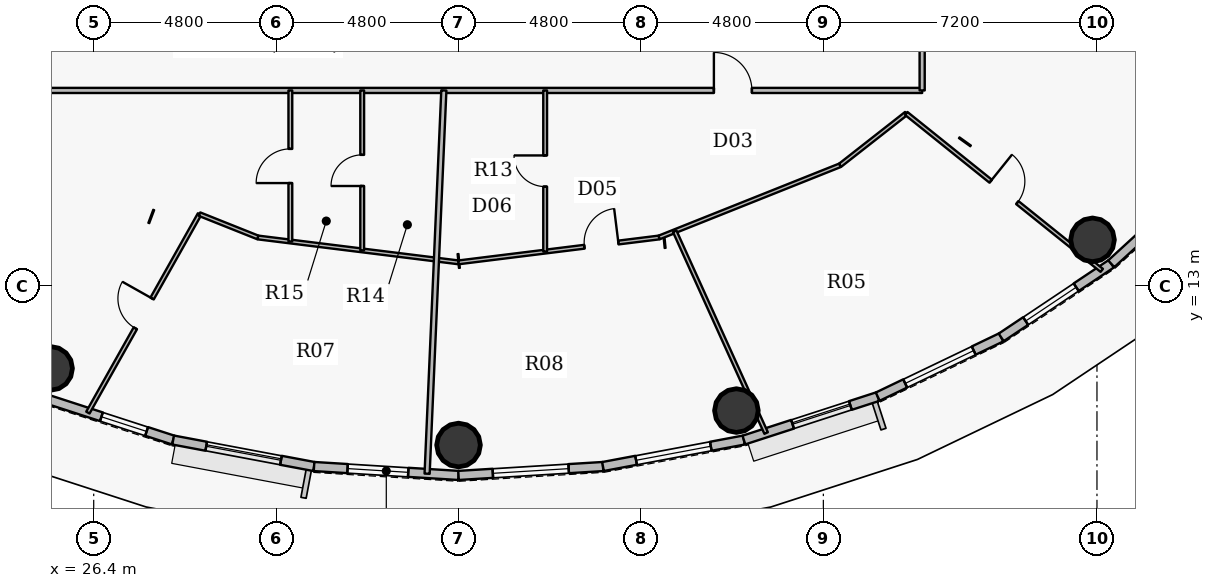
"""IFC4 building model, lengths in metres.
Left out: names, types, materials, properties, quantities, classifications, styles, units other than length and angle.
Written with IfcOpenShell. Run it as: python <this file> out.ifc"""

import sys

from ifc_helpers import new_model, si_unit, direction, frame, frame_2d, origin, origin_2d, place, context, subcontext, project, spatial, rectangle, hollow_circle, extrude, source, transform, mapped, element, fill, save


model = new_model("IFC4")
c1 = context("Model", 3, precision=1e-05, world=origin(), true_north=direction((0.0, 1.0)))
c2 = subcontext(c1, "Body", "Model", "MODEL_VIEW")
j1 = project(units=[si_unit("LENGTHUNIT", "METRE"), si_unit("PLANEANGLEUNIT", "RADIAN")], contexts=[c1])
p1 = place(None, origin())
s1 = spatial("IfcSite", under=j1, at=p1, CompositionType="ELEMENT")
p2 = place(p1, origin())
s2 = spatial("IfcBuilding", under=s1, at=p2, CompositionType="ELEMENT")
p3 = place(p2, frame((0.0, 0.0, 210.3)))
s3 = spatial("IfcBuildingStorey", under=s2, at=p3, CompositionType="ELEMENT", Elevation=210.3)
for number, where, z_axis, x_axis in (
    (1, (25.265, 10.836, -0.25), (0.0, 0.0, 1.0), (1.0, 0.0, 0.0)),
    (2, (36.0, 8.82, -0.25), (0.0, 0.0, 1.0), (1.0, 0.0, 0.0)),
    (3, (43.312, 9.727, -0.25), (0.0, 0.0, 1.0), (1.0, 0.0, 0.0)),
    (4, (52.683, 14.219, -0.25), (0.0, 0.0, 1.0), (1.0, 0.0, 0.0)),
):
    element("IfcColumn", number, at=place(p3, frame(where, z_axis=z_axis, x_axis=x_axis)), inside=s3, PredefinedType="COLUMN", context=c2, shape_type="SweptSolid", body=[
        extrude(hollow_circle(Radius=0.575, WallThickness=0.036, at=origin_2d()), origin(), (0.0, 0.0, 1.0), 4.0),
    ])
p4 = place(p3, frame((28.491, 8.951, 0.0), z_axis=(0.0, 0.0, 1.0), x_axis=(-0.951210789182, 0.308541787354, 0.0)))
e5 = element("IfcWall", 5, at=p4, inside=s3, PredefinedType="SOLIDWALL", context=c2, shape_type="SweptSolid", body=[
    extrude(rectangle(XDim=3.702, YDim=0.24, at=frame_2d((1.851, 0.0))), origin(), (0.0, 0.0, 1.0), 3.5),
])
p5 = place(p4, frame((0.735, 0.0, 0.9)))
e6 = element("IfcOpeningElement", 6, at=p5, cuts=e5, PredefinedType="OPENING", context=c2, shape_type="SweptSolid", body=[
    extrude(rectangle(XDim=1.25, YDim=1.65, at=origin_2d()), frame((0.625, 0.13, 0.825), z_axis=(0.0, -1.0, 0.0), x_axis=(1.0, 0.0, 0.0)), (0.0, 0.0, 1.0), 0.26),
])
p6 = place(p3, frame((32.198, 8.254, 0.0), z_axis=(0.0, 0.0, 1.0), x_axis=(-0.982784898575, 0.184753465822, 0.0)))
e7 = element("IfcWall", 7, at=p6, inside=s3, PredefinedType="SOLIDWALL", context=c2, shape_type="SweptSolid", body=[
    extrude(rectangle(XDim=3.773, YDim=0.24, at=frame_2d((1.886, 0.0))), origin(), (0.0, 0.0, 1.0), 3.5),
])
p7 = place(p6, frame((0.886, 0.0, 0.9)))
e8 = element("IfcOpeningElement", 8, at=p7, cuts=e7, PredefinedType="OPENING", context=c2, shape_type="SweptSolid", body=[
    extrude(rectangle(XDim=2.0, YDim=1.75, at=origin_2d()), frame((1.0, 0.13, 0.875), z_axis=(0.0, -1.0, 0.0), x_axis=(1.0, 0.0, 0.0)), (0.0, 0.0, 1.0), 0.26),
])
p8 = place(p3, frame((36.0, 8.02, 0.0), z_axis=(0.0, 0.0, 1.0), x_axis=(-0.998108785312, 0.06147237333, 0.0)))
e9 = element("IfcWall", 9, at=p8, inside=s3, PredefinedType="SOLIDWALL", context=c2, shape_type="SweptSolid", body=[
    extrude(rectangle(XDim=3.809, YDim=0.24, at=frame_2d((1.904, 0.0))), origin(), (0.0, 0.0, 1.0), 3.5),
])
p9 = place(p8, frame((1.326, 0.0, 0.9)))
e10 = element("IfcOpeningElement", 10, at=p9, cuts=e9, PredefinedType="OPENING", context=c2, shape_type="SweptSolid", body=[
    extrude(rectangle(XDim=1.6, YDim=1.75, at=origin_2d()), frame((0.8, 0.13, 0.875), z_axis=(0.0, -1.0, 0.0), x_axis=(1.0, 0.0, 0.0)), (0.0, 0.0, 1.0), 0.26),
])
p10 = place(p3, frame((39.802, 8.254, 0.0), z_axis=(0.0, 0.0, 1.0), x_axis=(-0.998108785312, -0.06147237333, 0.0)))
e11 = element("IfcWall", 11, at=p10, inside=s3, PredefinedType="SOLIDWALL", context=c2, shape_type="SweptSolid", body=[
    extrude(rectangle(XDim=3.809, YDim=0.24, at=frame_2d((1.904, 0.0))), origin(), (0.0, 0.0, 1.0), 3.5),
])
p11 = place(p10, frame((0.905, 0.0, 0.9)))
e12 = element("IfcOpeningElement", 12, at=p11, cuts=e11, PredefinedType="OPENING", context=c2, shape_type="SweptSolid", body=[
    extrude(rectangle(XDim=2.0, YDim=1.75, at=origin_2d()), frame((1.0, 0.13, 0.875), z_axis=(0.0, -1.0, 0.0), x_axis=(1.0, 0.0, 0.0)), (0.0, 0.0, 1.0), 0.26),
])
p12 = place(p3, frame((43.509, 8.951, 0.0), z_axis=(0.0, 0.0, 1.0), x_axis=(-0.982784898575, -0.184753465822, 0.0)))
e13 = element("IfcWall", 13, at=p12, inside=s3, PredefinedType="SOLIDWALL", context=c2, shape_type="SweptSolid", body=[
    extrude(rectangle(XDim=3.773, YDim=0.24, at=frame_2d((1.886, 0.0))), origin(), (0.0, 0.0, 1.0), 3.5),
])
p13 = place(p12, frame((0.886, 0.0, 0.9)))
e14 = element("IfcOpeningElement", 14, at=p13, cuts=e13, PredefinedType="OPENING", context=c2, shape_type="SweptSolid", body=[
    extrude(rectangle(XDim=2.0, YDim=1.75, at=origin_2d()), frame((1.0, 0.13, 0.875), z_axis=(0.0, -1.0, 0.0), x_axis=(1.0, 0.0, 0.0)), (0.0, 0.0, 1.0), 0.26),
])
p14 = place(p3, frame((47.031, 10.094, 0.0), z_axis=(0.0, 0.0, 1.0), x_axis=(-0.951210789182, -0.308541787354, 0.0)))
e15 = element("IfcWall", 15, at=p14, inside=s3, PredefinedType="SOLIDWALL", context=c2, shape_type="SweptSolid", body=[
    extrude(rectangle(XDim=3.702, YDim=0.24, at=frame_2d((1.851, 0.0))), origin(), (0.0, 0.0, 1.0), 3.5),
])
p15 = place(p14, frame((0.756, 0.0, 0.9)))
e16 = element("IfcOpeningElement", 16, at=p15, cuts=e15, PredefinedType="OPENING", context=c2, shape_type="SweptSolid", body=[
    extrude(rectangle(XDim=1.6, YDim=1.75, at=origin_2d()), frame((0.8, 0.13, 0.875), z_axis=(0.0, -1.0, 0.0), x_axis=(1.0, 0.0, 0.0)), (0.0, 0.0, 1.0), 0.26),
])
p16 = place(p3, frame((50.28, 11.652, 0.0), z_axis=(0.0, 0.0, 1.0), x_axis=(-0.901598104751, -0.432574684313, 0.0)))
e17 = element("IfcWall", 17, at=p16, inside=s3, PredefinedType="SOLIDWALL", context=c2, shape_type="SweptSolid", body=[
    extrude(rectangle(XDim=3.604, YDim=0.24, at=frame_2d((1.802, 0.0))), origin(), (0.0, 0.0, 1.0), 3.5),
])
p17 = place(p16, frame((0.802, 0.0, 0.9)))
e18 = element("IfcOpeningElement", 18, at=p17, cuts=e17, PredefinedType="OPENING", context=c2, shape_type="SweptSolid", body=[
    extrude(rectangle(XDim=2.0, YDim=1.75, at=origin_2d()), frame((1.0, 0.13, 0.875), z_axis=(0.0, -1.0, 0.0), x_axis=(1.0, 0.0, 0.0)), (0.0, 0.0, 1.0), 0.26),
])
p18 = place(p3, frame((53.176, 13.589, 0.0), z_axis=(0.0, 0.0, 1.0), x_axis=(-0.831262496074, -0.555880079352, 0.0)))
e19 = element("IfcWall", 19, at=p18, inside=s3, PredefinedType="SOLIDWALL", context=c2, shape_type="SweptSolid", body=[
    extrude(rectangle(XDim=3.484, YDim=0.24, at=frame_2d((1.742, 0.0))), origin(), (0.0, 0.0, 1.0), 3.5),
])
p19 = place(p18, frame((1.11, 0.0, 0.9)))
e20 = element("IfcOpeningElement", 20, at=p19, cuts=e19, PredefinedType="OPENING", context=c2, shape_type="SweptSolid", body=[
    extrude(rectangle(XDim=1.6, YDim=1.75, at=origin_2d()), frame((0.8, 0.13, 0.875), z_axis=(0.0, -1.0, 0.0), x_axis=(1.0, 0.0, 0.0)), (0.0, 0.0, 1.0), 0.26),
])
p20 = place(p3, frame((55.648, 15.855, 0.0), z_axis=(0.0, 0.0, 1.0), x_axis=(-0.737123922599, -0.675757591694, 0.0)))
e21 = element("IfcWall", 21, at=p20, inside=s3, PredefinedType="SOLIDWALL", context=c2, shape_type="SweptSolid", body=[
    extrude(rectangle(XDim=3.354, YDim=0.24, at=frame_2d((1.677, 0.0))), origin(), (0.0, 0.0, 1.0), 3.5),
])
p21 = place(p20, frame((1.052, 0.0, 0.9)))
e22 = element("IfcOpeningElement", 22, at=p21, cuts=e21, PredefinedType="OPENING", context=c2, shape_type="SweptSolid", body=[
    extrude(rectangle(XDim=1.25, YDim=1.65, at=origin_2d()), frame((0.625, 0.13, 0.825), z_axis=(0.0, -1.0, 0.0), x_axis=(1.0, 0.0, 0.0)), (0.0, 0.0, 1.0), 0.26),
])
p22 = place(p3, frame((24.35, 18.15, 0.0), z_axis=(0.0, 0.0, 1.0), x_axis=(1.0, 0.0, 0.0)))
e23 = element("IfcWall", 23, at=p22, inside=s3, PredefinedType="PARTITIONING", context=c2, shape_type="SweptSolid", body=[
    extrude(rectangle(XDim=23.85, YDim=0.135, at=frame_2d((11.925, 0.0))), origin(), (0.0, 0.0, 1.0), 2.935),
])
p23 = place(p22, frame((18.37, 0.0, 0.0)))
e24 = element("IfcOpeningElement", 24, at=p23, cuts=e23, PredefinedType="OPENING", context=c2, shape_type="SweptSolid", body=[
    extrude(rectangle(XDim=1.0, YDim=2.15, at=origin_2d()), frame((0.5, 0.078, 1.075), z_axis=(0.0, -1.0, 0.0), x_axis=(1.0, 0.0, 0.0)), (0.0, 0.0, 1.0), 0.155),
])
p24 = place(p3, frame((26.247, 9.674, 0.0), z_axis=(0.0, 0.0, 1.0), x_axis=(0.490510820462, 0.871435100859, 0.0)))
e25 = element("IfcWall", 25, at=p24, inside=s3, PredefinedType="PARTITIONING", context=c2, shape_type="SweptSolid", body=[
    extrude(rectangle(XDim=5.991, YDim=0.1, at=frame_2d((2.995, 0.0))), origin(), (0.0, 0.0, 1.0), 2.985),
])
p25 = place(p24, frame((2.545, 0.0, 0.0)))
e26 = element("IfcOpeningElement", 26, at=p25, cuts=e25, PredefinedType="OPENING", context=c2, shape_type="SweptSolid", body=[
    extrude(rectangle(XDim=0.9, YDim=2.1, at=origin_2d()), frame((0.45, 0.06, 1.05), z_axis=(0.0, -1.0, 0.0), x_axis=(1.0, 0.0, 0.0)), (0.0, 0.0, 1.0), 0.12),
])
p26 = place(p3, frame((29.186, 14.894, 0.0), z_axis=(0.0, 0.0, 1.0), x_axis=(0.928791895743, -0.37060169239, 0.0)))
e27 = element("IfcWall", 27, at=p26, inside=s3, PredefinedType="PARTITIONING", context=c2, shape_type="SweptSolid", body=[
    extrude(rectangle(XDim=1.654, YDim=0.1, at=frame_2d((0.827, 0.0))), origin(), (0.0, 0.0, 1.0), 3.5),
])
p27 = place(p3, frame((30.722, 14.281, 0.0), z_axis=(0.0, 0.0, 1.0), x_axis=(0.992398169186, -0.123068573551, 0.0)))
e28 = element("IfcWall", 28, at=p27, inside=s3, PredefinedType="PARTITIONING", context=c2, shape_type="SweptSolid", body=[
    extrude(rectangle(XDim=5.319, YDim=0.1, at=frame_2d((2.659, 0.0))), origin(), (0.0, 0.0, 1.0), 2.935),
])
p28 = place(p3, frame((31.574, 14.175, 0.0), z_axis=(0.0, 0.0, 1.0), x_axis=(0.0, 1.0, 0.0)))
e29 = element("IfcWall", 29, at=p28, inside=s3, PredefinedType="PARTITIONING", context=c2, shape_type="SweptSolid", body=[
    extrude(rectangle(XDim=3.975, YDim=0.1, at=frame_2d((1.987, 0.0))), origin(), (0.0, 0.0, 1.0), 3.5),
])
p29 = place(p28, frame((1.537, 0.0, 0.0)))
e30 = element("IfcOpeningElement", 30, at=p29, cuts=e29, PredefinedType="OPENING", context=c2, shape_type="SweptSolid", body=[
    extrude(rectangle(XDim=0.9, YDim=2.1, at=origin_2d()), frame((0.45, 0.06, 1.05), z_axis=(0.0, -1.0, 0.0), x_axis=(1.0, 0.0, 0.0)), (0.0, 0.0, 1.0), 0.12),
])
p30 = place(p3, frame((33.465, 13.941, 0.0), z_axis=(0.0, 0.0, 1.0), x_axis=(0.0, 1.0, 0.0)))
e31 = element("IfcWall", 31, at=p30, inside=s3, PredefinedType="PARTITIONING", context=c2, shape_type="SweptSolid", body=[
    extrude(rectangle(XDim=4.209, YDim=0.1, at=frame_2d((2.104, 0.0))), origin(), (0.0, 0.0, 1.0), 3.5),
])
p31 = place(p30, frame((1.695, 0.0, 0.0)))
e32 = element("IfcOpeningElement", 32, at=p31, cuts=e31, PredefinedType="OPENING", context=c2, shape_type="SweptSolid", body=[
    extrude(rectangle(XDim=0.82, YDim=2.1, at=origin_2d()), frame((0.41, 0.06, 1.05), z_axis=(0.0, -1.0, 0.0), x_axis=(1.0, 0.0, 0.0)), (0.0, 0.0, 1.0), 0.12),
])
p32 = place(p3, frame((35.173, 8.066, 0.0), z_axis=(0.0, 0.0, 1.0), x_axis=(0.043609362851, 0.999048659211, 0.0)))
e33 = element("IfcWall", 33, at=p32, inside=s3, PredefinedType="PARTITIONING", context=c2, shape_type="SweptSolid", body=[
    extrude(rectangle(XDim=10.094, YDim=0.135, at=frame_2d((5.047, 0.0))), origin(), (0.0, 0.0, 1.0), 2.985),
])
p33 = place(p3, frame((36.0, 13.626, 0.0), z_axis=(0.0, 0.0, 1.0), x_axis=(0.992398169186, 0.123068573551, 0.0)))
e34 = element("IfcWall", 34, at=p33, inside=s3, PredefinedType="PARTITIONING", context=c2, shape_type="SweptSolid", body=[
    extrude(rectangle(XDim=5.319, YDim=0.1, at=frame_2d((2.659, 0.0))), origin(), (0.0, 0.0, 1.0), 2.935),
])
p34 = place(p33, frame((3.338, 0.0, 0.0)))
e35 = element("IfcOpeningElement", 35, at=p34, cuts=e34, PredefinedType="OPENING", context=c2, shape_type="SweptSolid", body=[
    extrude(rectangle(XDim=0.9, YDim=2.1, at=origin_2d()), frame((0.45, 0.06, 1.05), z_axis=(0.0, -1.0, 0.0), x_axis=(1.0, 0.0, 0.0)), (0.0, 0.0, 1.0), 0.12),
])
p35 = place(p3, frame((38.28, 13.909, 0.0), z_axis=(0.0, 0.0, 1.0), x_axis=(0.0, 1.0, 0.0)))
e36 = element("IfcWall", 36, at=p35, inside=s3, PredefinedType="PARTITIONING", context=c2, shape_type="SweptSolid", body=[
    extrude(rectangle(XDim=4.241, YDim=0.1, at=frame_2d((2.12, 0.0))), origin(), (0.0, 0.0, 1.0), 2.985),
])
p36 = place(p35, frame((1.71, 0.0, 0.0)))
e37 = element("IfcOpeningElement", 37, at=p36, cuts=e36, PredefinedType="OPENING", context=c2, shape_type="SweptSolid", body=[
    extrude(rectangle(XDim=0.82, YDim=2.1, at=origin_2d()), frame((0.41, 0.06, 1.05), z_axis=(0.0, -1.0, 0.0), x_axis=(1.0, 0.0, 0.0)), (0.0, 0.0, 1.0), 0.12),
])
p37 = place(p3, frame((41.278, 14.281, 0.0), z_axis=(0.0, 0.0, 1.0), x_axis=(0.928801505367, 0.370577608105, 0.0)))
e38 = element("IfcWall", 38, at=p37, inside=s3, PredefinedType="PARTITIONING", context=c2, shape_type="SweptSolid", body=[
    extrude(rectangle(XDim=5.126, YDim=0.1, at=frame_2d((2.563, 0.0))), origin(), (0.0, 0.0, 1.0), 2.935),
])
p38 = place(p3, frame((41.689, 14.445, 0.0), z_axis=(0.0, 0.0, 1.0), x_axis=(0.412707571454, -0.910863579503, 0.0)))
e39 = element("IfcWall", 39, at=p38, inside=s3, PredefinedType="PARTITIONING", context=c2, shape_type="SweptSolid", body=[
    extrude(rectangle(XDim=5.829, YDim=0.1, at=frame_2d((2.914, 0.0))), origin(), (0.0, 0.0, 1.0), 2.985),
])
p39 = place(p3, frame((46.039, 16.181, 0.0), z_axis=(0.0, 0.0, 1.0), x_axis=(0.787393208494, 0.61645108096, 0.0)))
e40 = element("IfcWall", 40, at=p39, inside=s3, PredefinedType="PARTITIONING", context=c2, shape_type="SweptSolid", body=[
    extrude(rectangle(XDim=2.212, YDim=0.1, at=frame_2d((1.106, 0.0))), origin(), (0.0, 0.0, 1.0), 3.5),
])
p40 = place(p3, frame((47.781, 17.544, 0.0), z_axis=(0.0, 0.0, 1.0), x_axis=(0.77988571152, -0.625921941592, 0.0)))
e41 = element("IfcWall", 41, at=p40, inside=s3, PredefinedType="PARTITIONING", context=c2, shape_type="SweptSolid", body=[
    extrude(rectangle(XDim=6.596, YDim=0.1, at=frame_2d((3.298, 0.0))), origin(), (0.0, 0.0, 1.0), 2.985),
])
p41 = place(p40, frame((2.848, 0.0, 0.0)))
e42 = element("IfcOpeningElement", 42, at=p41, cuts=e41, PredefinedType="OPENING", context=c2, shape_type="SweptSolid", body=[
    extrude(rectangle(XDim=0.9, YDim=2.1, at=origin_2d()), frame((0.45, 0.06, 1.05), z_axis=(0.0, -1.0, 0.0), x_axis=(1.0, 0.0, 0.0)), (0.0, 0.0, 1.0), 0.12),
])
p42 = place(p3, frame((48.2, 18.15, 0.0), z_axis=(0.0, 0.0, 1.0), x_axis=(0.0, 1.0, 0.0)))
e43 = element("IfcWall", 43, at=p42, inside=s3, PredefinedType="PARTITIONING", context=c2, shape_type="SweptSolid", body=[
    extrude(rectangle(XDim=1.9, YDim=0.135, at=frame_2d((0.95, 0.0))), origin(), (0.0, 0.0, 1.0), 3.5),
])
m1 = source(origin(), c2, "Body", "SweptSolid", [
    extrude(rectangle(XDim=1.25, YDim=1.65, at=origin_2d()), frame((0.625, 0.03, 0.825), z_axis=(0.0, -1.0, 0.0), x_axis=(1.0, 0.0, 0.0)), (0.0, 0.0, 1.0), 0.06),
])
p43 = place(p5, origin())
e44 = element("IfcWindow", 44, at=p43, inside=s3, PartitioningType="SINGLE_PANEL", PredefinedType="WINDOW", context=c2, shape_type="MappedRepresentation", body=[
    mapped(m1, transform((0.0, 0.0, 0.0), x_axis=(1.0, 0.0, 0.0), y_axis=(0.0, 1.0, 0.0), z_axis=(0.0, 0.0, 1.0), scale=1.0)),
])
fill(e6, e44)
m2 = source(origin(), c2, "Body", "SweptSolid", [
    extrude(rectangle(XDim=2.0, YDim=1.75, at=origin_2d()), frame((1.0, 0.03, 0.875), z_axis=(0.0, -1.0, 0.0), x_axis=(1.0, 0.0, 0.0)), (0.0, 0.0, 1.0), 0.06),
])
p44 = place(p7, origin())
e45 = element("IfcWindow", 45, at=p44, inside=s3, PartitioningType="DOUBLE_PANEL_VERTICAL", PredefinedType="WINDOW", context=c2, shape_type="MappedRepresentation", body=[
    mapped(m2, transform((0.0, 0.0, 0.0), x_axis=(1.0, 0.0, 0.0), y_axis=(0.0, 1.0, 0.0), z_axis=(0.0, 0.0, 1.0), scale=1.0)),
])
fill(e8, e45)
m3 = source(origin(), c2, "Body", "SweptSolid", [
    extrude(rectangle(XDim=1.6, YDim=1.75, at=origin_2d()), frame((0.8, 0.03, 0.875), z_axis=(0.0, -1.0, 0.0), x_axis=(1.0, 0.0, 0.0)), (0.0, 0.0, 1.0), 0.06),
])
p45 = place(p9, origin())
e46 = element("IfcWindow", 46, at=p45, inside=s3, PartitioningType="DOUBLE_PANEL_VERTICAL", PredefinedType="WINDOW", context=c2, shape_type="MappedRepresentation", body=[
    mapped(m3, transform((0.0, 0.0, 0.0), x_axis=(1.0, 0.0, 0.0), y_axis=(0.0, 1.0, 0.0), z_axis=(0.0, 0.0, 1.0), scale=1.0)),
])
fill(e10, e46)
p46 = place(p11, origin())
e47 = element("IfcWindow", 47, at=p46, inside=s3, PartitioningType="DOUBLE_PANEL_VERTICAL", PredefinedType="WINDOW", context=c2, shape_type="MappedRepresentation", body=[
    mapped(m2, transform((0.0, 0.0, 0.0), x_axis=(1.0, 0.0, 0.0), y_axis=(0.0, 1.0, 0.0), z_axis=(0.0, 0.0, 1.0), scale=1.0)),
])
fill(e12, e47)
p47 = place(p13, origin())
e48 = element("IfcWindow", 48, at=p47, inside=s3, PartitioningType="DOUBLE_PANEL_VERTICAL", PredefinedType="WINDOW", context=c2, shape_type="MappedRepresentation", body=[
    mapped(m2, transform((0.0, 0.0, 0.0), x_axis=(1.0, 0.0, 0.0), y_axis=(0.0, 1.0, 0.0), z_axis=(0.0, 0.0, 1.0), scale=1.0)),
])
fill(e14, e48)
p48 = place(p15, origin())
e49 = element("IfcWindow", 49, at=p48, inside=s3, PartitioningType="DOUBLE_PANEL_VERTICAL", PredefinedType="WINDOW", context=c2, shape_type="MappedRepresentation", body=[
    mapped(m3, transform((0.0, 0.0, 0.0), x_axis=(1.0, 0.0, 0.0), y_axis=(0.0, 1.0, 0.0), z_axis=(0.0, 0.0, 1.0), scale=1.0)),
])
fill(e16, e49)
p49 = place(p17, origin())
e50 = element("IfcWindow", 50, at=p49, inside=s3, PartitioningType="DOUBLE_PANEL_VERTICAL", PredefinedType="WINDOW", context=c2, shape_type="MappedRepresentation", body=[
    mapped(m2, transform((0.0, 0.0, 0.0), x_axis=(1.0, 0.0, 0.0), y_axis=(0.0, 1.0, 0.0), z_axis=(0.0, 0.0, 1.0), scale=1.0)),
])
fill(e18, e50)
p50 = place(p19, origin())
e51 = element("IfcWindow", 51, at=p50, inside=s3, PartitioningType="DOUBLE_PANEL_VERTICAL", PredefinedType="WINDOW", context=c2, shape_type="MappedRepresentation", body=[
    mapped(m3, transform((0.0, 0.0, 0.0), x_axis=(1.0, 0.0, 0.0), y_axis=(0.0, 1.0, 0.0), z_axis=(0.0, 0.0, 1.0), scale=1.0)),
])
fill(e20, e51)
m4 = source(origin(), c2, "Body", "SweptSolid", [
    extrude(rectangle(XDim=0.9, YDim=2.1, at=origin_2d()), frame((0.45, 0.025, 1.05), z_axis=(0.0, -1.0, 0.0), x_axis=(1.0, 0.0, 0.0)), (0.0, 0.0, 1.0), 0.05),
])
p51 = place(p25, origin())
e52 = element("IfcDoor", 52, at=p51, inside=s3, OperationType="SINGLE_SWING_RIGHT", PredefinedType="DOOR", context=c2, shape_type="MappedRepresentation", body=[
    mapped(m4, transform((0.0, 0.0, 0.0), x_axis=(1.0, 0.0, 0.0), y_axis=(0.0, 1.0, 0.0), z_axis=(0.0, 0.0, 1.0), scale=1.0)),
])
fill(e26, e52)
p52 = place(p29, origin())
e53 = element("IfcDoor", 53, at=p52, inside=s3, OperationType="SINGLE_SWING_LEFT", PredefinedType="DOOR", context=c2, shape_type="MappedRepresentation", body=[
    mapped(m4, transform((0.0, 0.0, 0.0), x_axis=(1.0, 0.0, 0.0), y_axis=(0.0, 1.0, 0.0), z_axis=(0.0, 0.0, 1.0), scale=1.0)),
])
fill(e30, e53)
m5 = source(origin(), c2, "Body", "SweptSolid", [
    extrude(rectangle(XDim=0.82, YDim=2.1, at=origin_2d()), frame((0.41, 0.025, 1.05), z_axis=(0.0, -1.0, 0.0), x_axis=(1.0, 0.0, 0.0)), (0.0, 0.0, 1.0), 0.05),
])
p53 = place(p31, origin())
e54 = element("IfcDoor", 54, at=p53, inside=s3, OperationType="SINGLE_SWING_LEFT", PredefinedType="DOOR", context=c2, shape_type="MappedRepresentation", body=[
    mapped(m5, transform((0.0, 0.0, 0.0), x_axis=(1.0, 0.0, 0.0), y_axis=(0.0, 1.0, 0.0), z_axis=(0.0, 0.0, 1.0), scale=1.0)),
])
fill(e32, e54)
m6 = source(origin(), c2, "Body", "SweptSolid", [
    extrude(rectangle(XDim=1.0, YDim=2.15, at=origin_2d()), frame((0.5, 0.025, 1.075), z_axis=(0.0, -1.0, 0.0), x_axis=(1.0, 0.0, 0.0)), (0.0, 0.0, 1.0), 0.05),
])
p54 = place(p23, origin())
e55 = element("IfcDoor", 55, at=p54, inside=s3, OperationType="SINGLE_SWING_LEFT", PredefinedType="DOOR", context=c2, shape_type="MappedRepresentation", body=[
    mapped(m6, transform((0.0, 0.0, 0.0), x_axis=(1.0, 0.0, 0.0), y_axis=(0.0, 1.0, 0.0), z_axis=(0.0, 0.0, 1.0), scale=1.0)),
])
fill(e24, e55)
p55 = place(p34, origin())
e56 = element("IfcDoor", 56, at=p55, inside=s3, OperationType="SINGLE_SWING_RIGHT", PredefinedType="DOOR", context=c2, shape_type="MappedRepresentation", body=[
    mapped(m4, transform((0.0, 0.0, 0.0), x_axis=(1.0, 0.0, 0.0), y_axis=(0.0, 1.0, 0.0), z_axis=(0.0, 0.0, 1.0), scale=1.0)),
])
fill(e35, e56)
p56 = place(p41, origin())
e57 = element("IfcDoor", 57, at=p56, inside=s3, OperationType="SINGLE_SWING_LEFT", PredefinedType="DOOR", context=c2, shape_type="MappedRepresentation", body=[
    mapped(m4, transform((0.0, 0.0, 0.0), x_axis=(1.0, 0.0, 0.0), y_axis=(0.0, 1.0, 0.0), z_axis=(0.0, 0.0, 1.0), scale=1.0)),
])
fill(e42, e57)
p57 = place(p36, origin())
e58 = element("IfcDoor", 58, at=p57, inside=s3, OperationType="SINGLE_SWING_RIGHT", PredefinedType="DOOR", context=c2, shape_type="MappedRepresentation", body=[
    mapped(m5, transform((0.0, 0.0, 0.0), x_axis=(1.0, 0.0, 0.0), y_axis=(0.0, 1.0, 0.0), z_axis=(0.0, 0.0, 1.0), scale=1.0)),
])
fill(e37, e58)
save(model, sys.argv[1])
